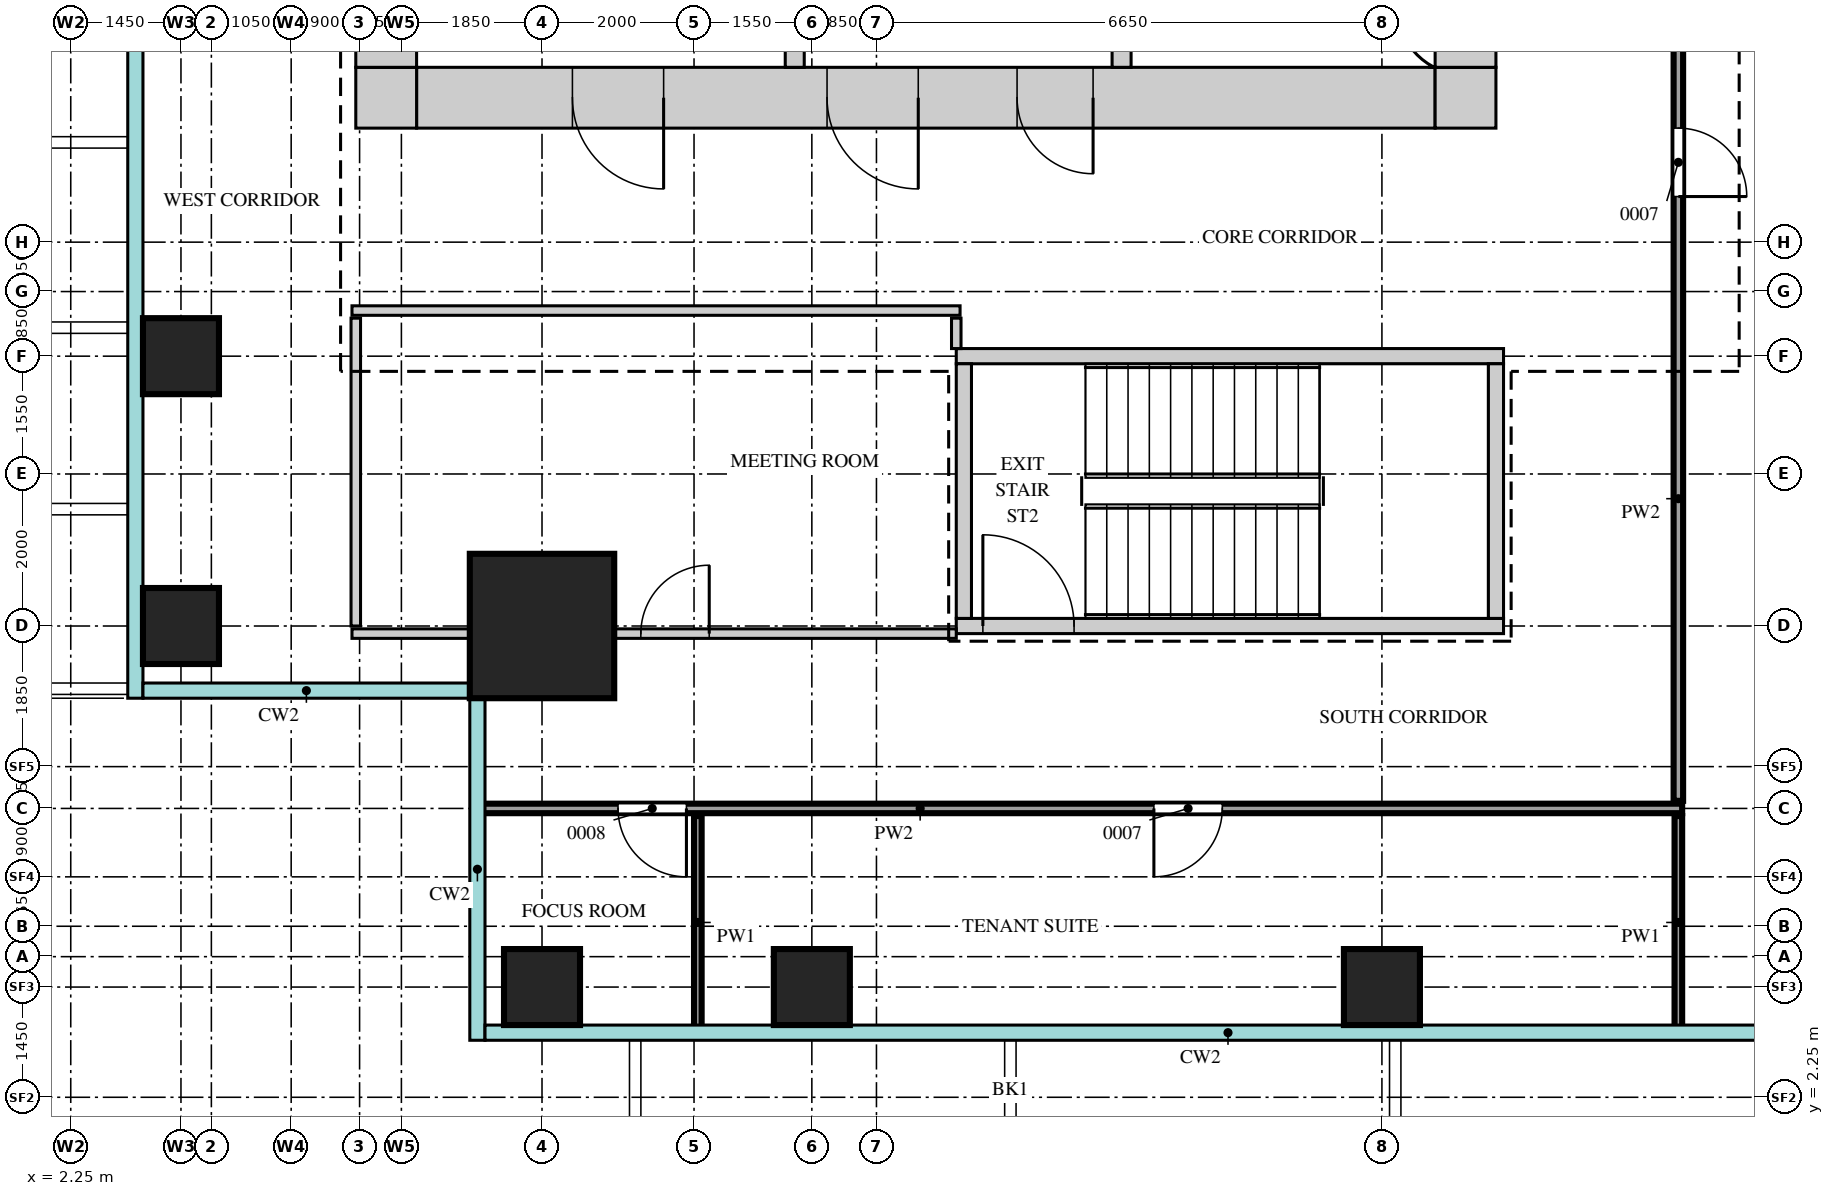
"""IFC4 building model, lengths in metres.
Left out: names, types, materials, properties, quantities, classifications, styles, units other than length and angle.
Written with IfcOpenShell. Run it as: python <this file> out.ifc"""

import sys

from ifc_helpers import new_model, si_unit, direction, frame, frame_2d, origin, origin_2d, place, context, subcontext, project, spatial, rectangle, extrude, source, transform, mapped, element, fill, save


model = new_model("IFC4")
c1 = context("Model", 3, precision=1e-05, world=origin(), true_north=direction((0.0, 1.0)))
c2 = subcontext(c1, "Body", "Model", "MODEL_VIEW")
j1 = project(units=[si_unit("LENGTHUNIT", "METRE"), si_unit("PLANEANGLEUNIT", "RADIAN")], contexts=[c1])
p1 = place(None, origin())
s1 = spatial("IfcSite", under=j1, at=p1, CompositionType="ELEMENT")
p2 = place(p1, origin())
s2 = spatial("IfcBuilding", under=s1, at=p2, CompositionType="ELEMENT")
p3 = place(p2, frame((0.0, 0.0, 176.7)))
s3 = spatial("IfcBuildingStorey", under=s2, at=p3, CompositionType="ELEMENT", Elevation=176.7)
m1 = source(origin(), c2, "Body", "SweptSolid", [
    extrude(rectangle(XDim=13.4, YDim=0.8, at=frame_2d((6.7, 0.0))), origin(), (0.0, 0.0, 1.0), 3.75),
])
p4 = place(p3, frame((6.8, 15.4, 0.0), z_axis=(0.0, 0.0, 1.0), x_axis=(1.0, 0.0, 0.0)))
e1 = element("IfcWall", 1, at=p4, inside=s3, PredefinedType="SHEAR", context=c2, shape_type="MappedRepresentation", body=[
    mapped(m1, transform((0.0, 0.0, 0.0))),
])
m2 = source(origin(), c2, "Body", "SweptSolid", [
    extrude(rectangle(XDim=1.2, YDim=2.1, at=frame_2d((0.6, 1.05))), frame((0.0, 0.41, 0.0), z_axis=(0.0, -1.0, 0.0), x_axis=(1.0, 0.0, 0.0)), (0.0, 0.0, 1.0), 0.82),
])
p5 = place(p4, frame((5.4, 0.0, 0.0)))
e2 = element("IfcOpeningElement", 2, at=p5, cuts=e1, PredefinedType="OPENING", context=c2, shape_type="MappedRepresentation", body=[
    mapped(m2, transform((0.0, 0.0, 0.0))),
])
p6 = place(p4, frame((2.05, 0.0, 0.0)))
e3 = element("IfcOpeningElement", 3, at=p6, cuts=e1, PredefinedType="OPENING", context=c2, shape_type="MappedRepresentation", body=[
    mapped(m2, transform((0.0, 0.0, 0.0))),
])
m3 = source(origin(), c2, "Body", "SweptSolid", [
    extrude(rectangle(XDim=1.0, YDim=2.1, at=frame_2d((0.5, 1.05))), frame((0.0, 0.41, 0.0), z_axis=(0.0, -1.0, 0.0), x_axis=(1.0, 0.0, 0.0)), (0.0, 0.0, 1.0), 0.82),
])
p7 = place(p4, frame((7.9, 0.0, 0.0)))
e4 = element("IfcOpeningElement", 4, at=p7, cuts=e1, PredefinedType="OPENING", context=c2, shape_type="MappedRepresentation", body=[
    mapped(m3, transform((0.0, 0.0, 0.0))),
])
m4 = source(origin(), c2, "Body", "SweptSolid", [
    extrude(rectangle(XDim=0.8, YDim=0.8, at=frame_2d((0.4, 0.0))), origin(), (0.0, 0.0, 1.0), 3.75),
])
for number, where, z_axis, x_axis in (
    (5, (20.2, 15.4, 0.0), (0.0, 0.0, 1.0), (1.0, 0.0, 0.0)),
    (6, (6.0, 15.4, 0.0), (0.0, 0.0, 1.0), (1.0, 0.0, 0.0)),
):
    element("IfcWall", number, at=place(p3, frame(where, z_axis=z_axis, x_axis=x_axis)), inside=s3, PredefinedType="SHEAR", context=c2, shape_type="MappedRepresentation", body=[
        mapped(m4, transform((0.0, 0.0, 0.0))),
    ])
m5 = source(origin(), c2, "Body", "SweptSolid", [
    extrude(rectangle(XDim=22.4, YDim=0.8, at=frame_2d((11.2, 0.0))), origin(), (0.0, 0.0, 1.0), 3.75),
])
p8 = place(p3, frame((20.6, 15.8, 0.0), z_axis=(0.0, 0.0, 1.0), x_axis=(0.0, 1.0, 0.0)))
e7 = element("IfcWall", 7, at=p8, inside=s3, PredefinedType="SHEAR", context=c2, shape_type="MappedRepresentation", body=[
    mapped(m5, transform((0.0, 0.0, 0.0))),
])
m6 = source(origin(), c2, "Body", "SweptSolid", [
    extrude(rectangle(XDim=1.8, YDim=2.1, at=frame_2d((0.9, 1.05))), frame((0.0, 0.41, 0.0), z_axis=(0.0, -1.0, 0.0), x_axis=(1.0, 0.0, 0.0)), (0.0, 0.0, 1.0), 0.82),
])
p9 = place(p8, frame((10.7, 0.0, 0.0)))
e8 = element("IfcOpeningElement", 8, at=p9, cuts=e7, PredefinedType="OPENING", context=c2, shape_type="MappedRepresentation", body=[
    mapped(m6, transform((0.0, 0.0, 0.0))),
])
m7 = source(origin(), c2, "Body", "SweptSolid", [
    extrude(rectangle(XDim=0.9, YDim=2.1, at=frame_2d((0.45, 1.05))), frame((0.0, 0.41, 0.0), z_axis=(0.0, -1.0, 0.0), x_axis=(1.0, 0.0, 0.0)), (0.0, 0.0, 1.0), 0.82),
])
p10 = place(p8, frame((0.35, 0.0, 0.0)))
e9 = element("IfcOpeningElement", 9, at=p10, cuts=e7, PredefinedType="OPENING", context=c2, shape_type="MappedRepresentation", body=[
    mapped(m7, transform((0.0, 0.0, 0.0))),
])
p11 = place(p8, frame((3.9, 0.0, 0.0)))
e10 = element("IfcOpeningElement", 10, at=p11, cuts=e7, PredefinedType="OPENING", context=c2, shape_type="MappedRepresentation", body=[
    mapped(m7, transform((0.0, 0.0, 0.0))),
])
p12 = place(p3, frame((6.4, 15.8, 0.0), z_axis=(0.0, 0.0, 1.0), x_axis=(0.0, 1.0, 0.0)))
e11 = element("IfcWall", 11, at=p12, inside=s3, PredefinedType="SHEAR", context=c2, shape_type="MappedRepresentation", body=[
    mapped(m5, transform((0.0, 0.0, 0.0))),
])
m8 = source(origin(), c2, "Body", "SweptSolid", [
    extrude(rectangle(XDim=7.2, YDim=0.2, at=frame_2d((3.6, 0.0))), origin(), (0.0, 0.0, 1.0), 3.75),
])
p13 = place(p3, frame((13.9, 12.0, 0.0), z_axis=(0.0, 0.0, 1.0), x_axis=(1.0, 0.0, 0.0)))
e12 = element("IfcWall", 12, at=p13, inside=s3, PredefinedType="SHEAR", context=c2, shape_type="MappedRepresentation", body=[
    mapped(m8, transform((0.0, 0.0, 0.0))),
])
p14 = place(p3, frame((13.9, 8.45, 0.0), z_axis=(0.0, 0.0, 1.0), x_axis=(1.0, 0.0, 0.0)))
e13 = element("IfcWall", 13, at=p14, inside=s3, PredefinedType="SHEAR", context=c2, shape_type="MappedRepresentation", body=[
    mapped(m8, transform((0.0, 0.0, 0.0))),
])
m9 = source(origin(), c2, "Body", "SweptSolid", [
    extrude(rectangle(XDim=1.2, YDim=2.1, at=frame_2d((0.6, 1.05))), frame((0.0, 0.11, 0.0), z_axis=(0.0, -1.0, 0.0), x_axis=(1.0, 0.0, 0.0)), (0.0, 0.0, 1.0), 0.22),
])
p15 = place(p14, frame((0.35, 0.0, 0.0)))
e14 = element("IfcOpeningElement", 14, at=p15, cuts=e13, PredefinedType="OPENING", context=c2, shape_type="MappedRepresentation", body=[
    mapped(m9, transform((0.0, 0.0, 0.0))),
])
m10 = source(origin(), c2, "Body", "SweptSolid", [
    extrude(rectangle(XDim=3.35, YDim=0.2, at=frame_2d((1.675, 0.0))), origin(), (0.0, 0.0, 1.0), 3.75),
])
for number, where, z_axis, x_axis in (
    (15, (21.0, 8.55, 0.0), (0.0, 0.0, 1.0), (0.0, 1.0, 0.0)),
    (16, (14.0, 8.55, 0.0), (0.0, 0.0, 1.0), (0.0, 1.0, 0.0)),
):
    element("IfcWall", number, at=place(p3, frame(where, z_axis=z_axis, x_axis=x_axis)), inside=s3, PredefinedType="SHEAR", context=c2, shape_type="MappedRepresentation", body=[
        mapped(m10, transform((0.0, 0.0, 0.0))),
    ])
m11 = source(origin(), c2, "Body", "SweptSolid", [
    extrude(rectangle(XDim=3.4, YDim=0.25, at=frame_2d((1.7, 0.0))), origin(), (0.0, 0.0, 1.0), 3.75),
])
for number, where, z_axis, x_axis in (
    (17, (16.075, 15.8, 0.0), (0.0, 0.0, 1.0), (0.0, 1.0, 0.0)),
    (18, (11.775, 15.8, 0.0), (0.0, 0.0, 1.0), (0.0, 1.0, 0.0)),
):
    element("IfcWall", number, at=place(p3, frame(where, z_axis=z_axis, x_axis=x_axis)), inside=s3, PredefinedType="STANDARD", context=c2, shape_type="MappedRepresentation", body=[
        mapped(m11, transform((0.0, 0.0, 0.0))),
    ])
m12 = source(origin(), c2, "Body", "SweptSolid", [
    extrude(rectangle(XDim=1.9, YDim=1.9, at=origin_2d()), origin(), (0.0, 0.0, 1.0), 4.0),
])
p16 = place(p3, frame((8.45, 8.45, 0.0), z_axis=(0.0, 0.0, 1.0), x_axis=(1.0, 0.0, 0.0)))
e19 = element("IfcColumn", 19, at=p16, inside=s3, PredefinedType="COLUMN", context=c2, shape_type="MappedRepresentation", body=[
    mapped(m12, transform((0.0, 0.0, 0.0))),
])
m13 = source(origin(), c2, "Body", "SweptSolid", [
    extrude(rectangle(XDim=1.0, YDim=1.0, at=origin_2d()), origin(), (0.0, 0.0, 1.0), 3.75),
])
for number, where, z_axis, x_axis in (
    (20, (8.45, 3.7, 0.0), (0.0, 0.0, 1.0), (1.0, 0.0, 0.0)),
    (21, (12.0, 3.7, 0.0), (0.0, 0.0, 1.0), (1.0, 0.0, 0.0)),
    (22, (19.5, 3.7, 0.0), (0.0, 0.0, 1.0), (1.0, 0.0, 0.0)),
    (23, (3.7, 8.45, 0.0), (0.0, 0.0, 1.0), (1.0, 0.0, 0.0)),
    (24, (3.7, 12.0, 0.0), (0.0, 0.0, 1.0), (1.0, 0.0, 0.0)),
):
    element("IfcColumn", number, at=place(p3, frame(where, z_axis=z_axis, x_axis=x_axis)), inside=s3, PredefinedType="COLUMN", context=c2, shape_type="MappedRepresentation", body=[
        mapped(m13, transform((0.0, 0.0, 0.0))),
    ])
m14 = source(origin(), c2, "Body", "SweptSolid", [
    extrude(rectangle(XDim=2.8, YDim=0.1, at=frame_2d((1.4, 0.0))), origin(), (0.0, 0.0, 1.0), 3.8),
])
for number, where, z_axis, x_axis in (
    (25, (10.5, 3.15, 0.0), (0.0, 0.0, 1.0), (0.0, 1.0, 0.0)),
    (26, (23.4, 3.15, 0.0), (0.0, 0.0, 1.0), (0.0, 1.0, 0.0)),
):
    element("IfcWall", number, at=place(p3, frame(where, z_axis=z_axis, x_axis=x_axis)), inside=s3, PredefinedType="PARTITIONING", context=c2, shape_type="MappedRepresentation", body=[
        mapped(m14, transform((0.0, 0.0, 0.0))),
    ])
m15 = source(origin(), c2, "Body", "SweptSolid", [
    extrude(rectangle(XDim=15.8, YDim=0.125, at=frame_2d((7.9, 0.0))), origin(), (0.0, 0.0, 1.0), 3.8),
])
p17 = place(p3, frame((7.65, 6.05, 0.0), z_axis=(0.0, 0.0, 1.0), x_axis=(1.0, 0.0, 0.0)))
e27 = element("IfcWall", 27, at=p17, inside=s3, PredefinedType="PARTITIONING", context=c2, shape_type="MappedRepresentation", body=[
    mapped(m15, transform((0.0, 0.0, 0.0))),
])
m16 = source(origin(), c2, "Body", "SweptSolid", [
    extrude(rectangle(XDim=0.9, YDim=2.1, at=frame_2d((0.45, 1.05))), frame((0.0, 0.073, 0.0), z_axis=(0.0, -1.0, 0.0), x_axis=(1.0, 0.0, 0.0)), (0.0, 0.0, 1.0), 0.145),
])
p18 = place(p17, frame((1.8, 0.0, 0.0)))
e28 = element("IfcOpeningElement", 28, at=p18, cuts=e27, PredefinedType="OPENING", context=c2, shape_type="MappedRepresentation", body=[
    mapped(m16, transform((0.0, 0.0, 0.0))),
])
p19 = place(p17, frame((8.85, 0.0, 0.0)))
e29 = element("IfcOpeningElement", 29, at=p19, cuts=e27, PredefinedType="OPENING", context=c2, shape_type="MappedRepresentation", body=[
    mapped(m16, transform((0.0, 0.0, 0.0))),
])
m17 = source(origin(), c2, "Body", "SweptSolid", [
    extrude(rectangle(XDim=14.75, YDim=0.125, at=frame_2d((7.375, 0.0))), origin(), (0.0, 0.0, 1.0), 3.8),
])
p20 = place(p3, frame((23.4, 6.15, 0.0), z_axis=(0.0, 0.0, 1.0), x_axis=(0.0, 1.0, 0.0)))
e30 = element("IfcWall", 30, at=p20, inside=s3, PredefinedType="PARTITIONING", context=c2, shape_type="MappedRepresentation", body=[
    mapped(m17, transform((0.0, 0.0, 0.0))),
])
p21 = place(p20, frame((7.95, 0.0, 0.0)))
e31 = element("IfcOpeningElement", 31, at=p21, cuts=e30, PredefinedType="OPENING", context=c2, shape_type="MappedRepresentation", body=[
    mapped(m16, transform((0.0, 0.0, 0.0))),
])
m18 = source(origin(), c2, "Body", "SweptSolid", [
    extrude(rectangle(XDim=7.95, YDim=0.125, at=frame_2d((3.975, 0.0))), origin(), (0.0, 0.0, 1.0), 3.25),
])
p22 = place(p3, frame((5.95, 8.35, 0.0), z_axis=(0.0, 0.0, 1.0), x_axis=(1.0, 0.0, 0.0)))
e32 = element("IfcWall", 32, at=p22, inside=s3, PredefinedType="PARTITIONING", context=c2, shape_type="MappedRepresentation", body=[
    mapped(m18, transform((0.0, 0.0, 0.0))),
])
p23 = place(p22, frame((3.8, 0.0, 0.0)))
e33 = element("IfcOpeningElement", 33, at=p23, cuts=e32, PredefinedType="OPENING", context=c2, shape_type="MappedRepresentation", body=[
    mapped(m16, transform((0.0, 0.0, 0.0))),
])
m19 = source(origin(), c2, "Body", "SweptSolid", [
    extrude(rectangle(XDim=4.05, YDim=0.125, at=frame_2d((2.025, 0.0))), origin(), (0.0, 0.0, 1.0), 3.8),
])
p24 = place(p3, frame((6.0, 8.45, 0.0), z_axis=(0.0, 0.0, 1.0), x_axis=(0.0, 1.0, 0.0)))
e34 = element("IfcWall", 34, at=p24, inside=s3, PredefinedType="PARTITIONING", context=c2, shape_type="MappedRepresentation", body=[
    mapped(m19, transform((0.0, 0.0, 0.0))),
])
m20 = source(origin(), c2, "Body", "SweptSolid", [
    extrude(rectangle(XDim=0.4, YDim=0.125, at=frame_2d((0.2, 0.0))), origin(), (0.0, 0.0, 1.0), 3.8),
])
p25 = place(p3, frame((13.9, 12.1, 0.0), z_axis=(0.0, 0.0, 1.0), x_axis=(0.0, 1.0, 0.0)))
e35 = element("IfcWall", 35, at=p25, inside=s3, PredefinedType="PARTITIONING", context=c2, shape_type="MappedRepresentation", body=[
    mapped(m20, transform((0.0, 0.0, 0.0))),
])
m21 = source(origin(), c2, "Body", "SweptSolid", [
    extrude(rectangle(XDim=8.0, YDim=0.125, at=frame_2d((4.0, 0.0))), origin(), (0.0, 0.0, 1.0), 3.8),
])
p26 = place(p3, frame((5.95, 12.6, 0.0), z_axis=(0.0, 0.0, 1.0), x_axis=(1.0, 0.0, 0.0)))
e36 = element("IfcWall", 36, at=p26, inside=s3, PredefinedType="PARTITIONING", context=c2, shape_type="MappedRepresentation", body=[
    mapped(m21, transform((0.0, 0.0, 0.0))),
])
m22 = source(origin(), c2, "Body", "SweptSolid", [
    extrude(rectangle(XDim=1.2, YDim=2.1, at=frame_2d((0.6, 1.05))), frame((0.0, 0.35, 0.0), z_axis=(0.0, -1.0, 0.0), x_axis=(1.0, 0.0, 0.0)), (0.0, 0.0, 1.0), 0.7),
])
p27 = place(p5, origin())
e37 = element("IfcDoor", 37, at=p27, inside=s3, OperationType="SINGLE_SWING_RIGHT", PredefinedType="DOOR", context=c2, shape_type="MappedRepresentation", body=[
    mapped(m22, transform((0.0, 0.0, 0.0))),
])
fill(e2, e37)
p28 = place(p6, origin())
e38 = element("IfcDoor", 38, at=p28, inside=s3, OperationType="SINGLE_SWING_RIGHT", PredefinedType="DOOR", context=c2, shape_type="MappedRepresentation", body=[
    mapped(m22, transform((0.0, 0.0, 0.0))),
])
fill(e3, e38)
m23 = source(origin(), c2, "Body", "SweptSolid", [
    extrude(rectangle(XDim=1.0, YDim=2.1, at=frame_2d((0.5, 1.05))), frame((0.0, 0.35, 0.0), z_axis=(0.0, -1.0, 0.0), x_axis=(1.0, 0.0, 0.0)), (0.0, 0.0, 1.0), 0.7),
])
p29 = place(p7, origin())
e39 = element("IfcDoor", 39, at=p29, inside=s3, OperationType="SINGLE_SWING_RIGHT", PredefinedType="DOOR", context=c2, shape_type="MappedRepresentation", body=[
    mapped(m23, transform((0.0, 0.0, 0.0))),
])
fill(e4, e39)
m24 = source(origin(), c2, "Body", "SweptSolid", [
    extrude(rectangle(XDim=0.9, YDim=2.1, at=frame_2d((0.45, 1.05))), frame((0.0, 0.025, 0.0), z_axis=(0.0, -1.0, 0.0), x_axis=(1.0, 0.0, 0.0)), (0.0, 0.0, 1.0), 0.05),
])
p30 = place(p21, origin())
e40 = element("IfcDoor", 40, at=p30, inside=s3, OperationType="SINGLE_SWING_LEFT", PredefinedType="DOOR", context=c2, shape_type="MappedRepresentation", body=[
    mapped(m24, transform((0.0, 0.0, 0.0))),
])
fill(e31, e40)
p31 = place(p23, origin())
e41 = element("IfcDoor", 41, at=p31, inside=s3, OperationType="SINGLE_SWING_LEFT", PredefinedType="DOOR", context=c2, shape_type="MappedRepresentation", body=[
    mapped(m24, transform((0.0, 0.0, 0.0))),
])
fill(e33, e41)
p32 = place(p18, origin())
e42 = element("IfcDoor", 42, at=p32, inside=s3, OperationType="SINGLE_SWING_RIGHT", PredefinedType="DOOR", context=c2, shape_type="MappedRepresentation", body=[
    mapped(m24, transform((0.0, 0.0, 0.0))),
])
fill(e28, e42)
p33 = place(p19, origin())
e43 = element("IfcDoor", 43, at=p33, inside=s3, OperationType="SINGLE_SWING_LEFT", PredefinedType="DOOR", context=c2, shape_type="MappedRepresentation", body=[
    mapped(m24, transform((0.0, 0.0, 0.0))),
])
fill(e29, e43)
m25 = source(origin(), c2, "Body", "SweptSolid", [
    extrude(rectangle(XDim=1.2, YDim=2.1, at=frame_2d((0.6, 1.05))), frame((0.0, 0.025, 0.0), z_axis=(0.0, -1.0, 0.0), x_axis=(1.0, 0.0, 0.0)), (0.0, 0.0, 1.0), 0.05),
])
p34 = place(p15, origin())
e44 = element("IfcDoor", 44, at=p34, inside=s3, OperationType="SINGLE_SWING_RIGHT", PredefinedType="DOOR", context=c2, shape_type="MappedRepresentation", body=[
    mapped(m25, transform((0.0, 0.0, 0.0))),
])
fill(e14, e44)
save(model, sys.argv[1])
